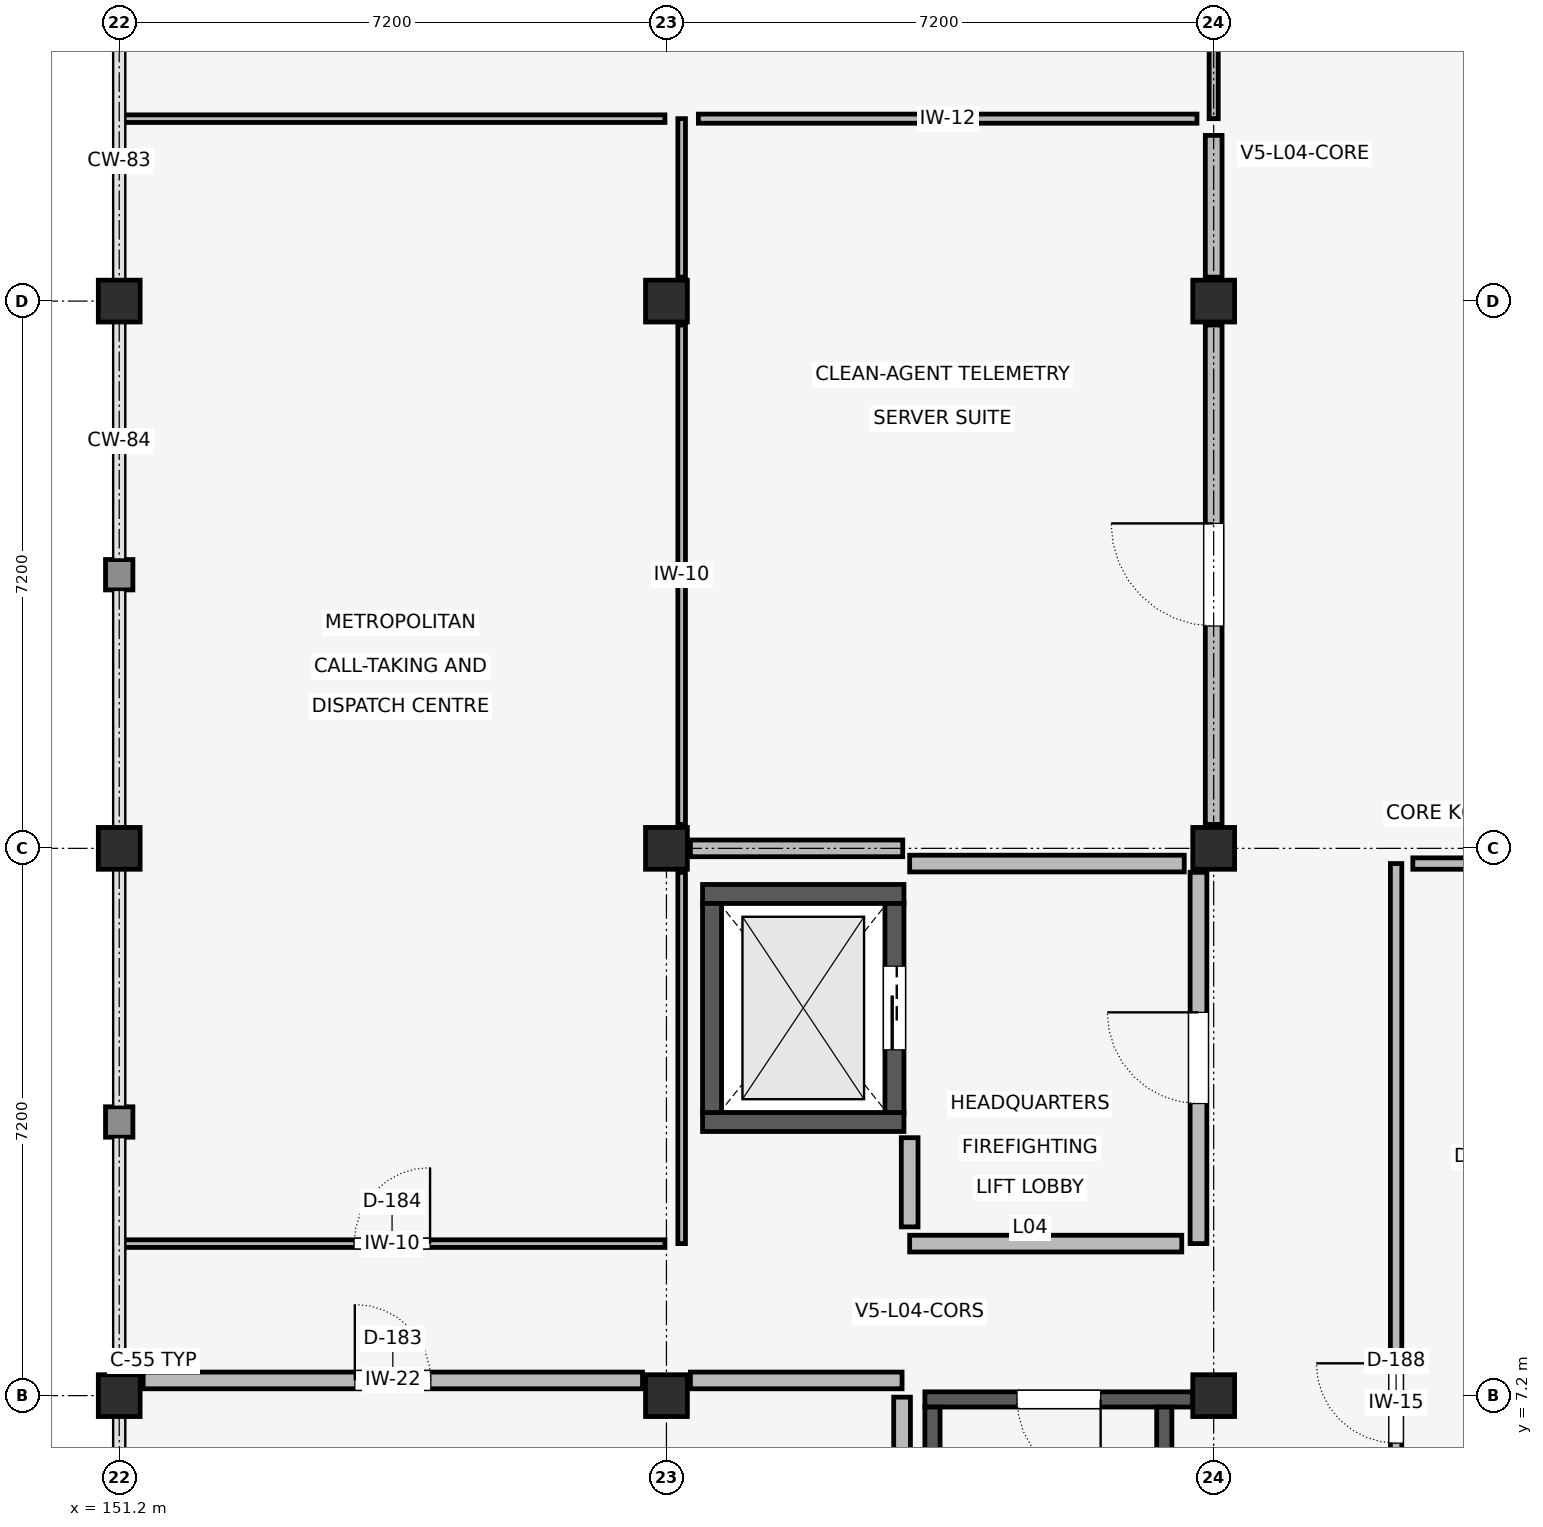
"""IFC4 building model, lengths in metres.
Left out: names, types, materials, properties, quantities, classifications, styles, units other than length and angle.
Written with IfcOpenShell. Run it as: python <this file> out.ifc"""

import sys

from ifc_helpers import new_model, si_unit, direction, frame, frame_2d, origin, origin_2d, place, context, subcontext, project, spatial, rectangle, extrude, element, fill, save


model = new_model("IFC4")
c1 = context("Model", 3, precision=1e-05, world=origin(), true_north=direction((0.0, 1.0)))
c2 = subcontext(c1, "Body", "Model", "MODEL_VIEW")
j1 = project(units=[si_unit("LENGTHUNIT", "METRE"), si_unit("PLANEANGLEUNIT", "RADIAN")], contexts=[c1])
p1 = place(None, origin())
s1 = spatial("IfcSite", under=j1, at=p1, CompositionType="ELEMENT")
p2 = place(p1, origin())
s2 = spatial("IfcBuilding", under=s1, at=p2, CompositionType="ELEMENT")
p3 = place(p2, frame((0.0, 0.0, 17.4)))
s3 = spatial("IfcBuildingStorey", under=s2, at=p3, CompositionType="ELEMENT", Elevation=17.4)
for number, where, z_axis, x_axis in (
    (1, (151.2, 7.2, 0.0), (0.0, 0.0, 1.0), (1.0, 0.0, 0.0)),
    (2, (151.2, 14.4, 0.0), (0.0, 0.0, 1.0), (1.0, 0.0, 0.0)),
    (3, (151.2, 21.6, 0.0), (0.0, 0.0, 1.0), (1.0, 0.0, 0.0)),
    (4, (158.4, 7.2, 0.0), (0.0, 0.0, 1.0), (1.0, 0.0, 0.0)),
    (5, (158.4, 14.4, 0.0), (0.0, 0.0, 1.0), (1.0, 0.0, 0.0)),
    (6, (158.4, 21.6, 0.0), (0.0, 0.0, 1.0), (1.0, 0.0, 0.0)),
    (7, (165.6, 7.2, 0.0), (0.0, 0.0, 1.0), (1.0, 0.0, 0.0)),
    (8, (165.6, 14.4, 0.0), (0.0, 0.0, 1.0), (1.0, 0.0, 0.0)),
    (9, (165.6, 21.6, 0.0), (0.0, 0.0, 1.0), (1.0, 0.0, 0.0)),
):
    element("IfcColumn", number, at=place(p3, frame(where, z_axis=z_axis, x_axis=x_axis)), inside=s3, PredefinedType="COLUMN", context=c2, shape_type="SweptSolid", body=[
        extrude(rectangle(XDim=0.55, YDim=0.55, at=origin_2d()), origin(), (0.0, 0.0, 1.0), 3.9),
    ])
for number, where, z_axis, x_axis in (
    (10, (158.875, 10.8, 0.0), (0.0, 0.0, 1.0), (1.0, 0.0, 0.0)),
    (11, (158.875, 13.8, 0.0), (0.0, 0.0, 1.0), (1.0, 0.0, 0.0)),
):
    element("IfcWall", number, at=place(p3, frame(where, z_axis=z_axis, x_axis=x_axis)), inside=s3, PredefinedType="SHEAR", context=c2, shape_type="SweptSolid", body=[
        extrude(rectangle(XDim=2.65, YDim=0.25, at=frame_2d((1.325, 0.0))), origin(), (0.0, 0.0, 1.0), 3.62),
    ])
p4 = place(p3, frame((159.0, 10.925, 0.0), z_axis=(0.0, 0.0, 1.0), x_axis=(0.0, 1.0, 0.0)))
e12 = element("IfcWall", 12, at=p4, inside=s3, PredefinedType="SHEAR", context=c2, shape_type="SweptSolid", body=[
    extrude(rectangle(XDim=2.75, YDim=0.25, at=frame_2d((1.375, 0.0))), origin(), (0.0, 0.0, 1.0), 3.62),
])
p5 = place(p3, frame((161.4, 10.925, 0.0), z_axis=(0.0, 0.0, 1.0), x_axis=(0.0, 1.0, 0.0)))
e13 = element("IfcWall", 13, at=p5, inside=s3, PredefinedType="SHEAR", context=c2, shape_type="SweptSolid", body=[
    extrude(rectangle(XDim=2.75, YDim=0.25, at=frame_2d((1.375, 0.0))), origin(), (0.0, 0.0, 1.0), 3.62),
])
p6 = place(p5, frame((0.825, 0.0, 0.0)))
e14 = element("IfcOpeningElement", 14, at=p6, cuts=e13, PredefinedType="OPENING", context=c2, shape_type="SweptSolid", body=[
    extrude(rectangle(XDim=1.1, YDim=2.15, at=frame_2d((0.55, 1.075))), frame((0.0, 0.137, 0.0), z_axis=(0.0, -1.0, 0.0), x_axis=(1.0, 0.0, 0.0)), (0.0, 0.0, 1.0), 0.274),
])
p7 = place(p3, frame((161.8, 7.15, 0.0), z_axis=(0.0, 0.0, 1.0), x_axis=(1.0, 0.0, 0.0)))
e15 = element("IfcWall", 15, at=p7, inside=s3, PredefinedType="SHEAR", context=c2, shape_type="SweptSolid", body=[
    extrude(rectangle(XDim=3.525, YDim=0.2, at=frame_2d((1.762, 0.0))), origin(), (0.0, 0.0, 1.0), 3.62),
])
p8 = place(p7, frame((1.212, 0.0, 0.0)))
e16 = element("IfcOpeningElement", 16, at=p8, cuts=e15, PredefinedType="OPENING", context=c2, shape_type="SweptSolid", body=[
    extrude(rectangle(XDim=1.1, YDim=2.15, at=frame_2d((0.55, 1.075))), frame((0.0, 0.112, 0.0), z_axis=(0.0, -1.0, 0.0), x_axis=(1.0, 0.0, 0.0)), (0.0, 0.0, 1.0), 0.224),
])
for number, where, z_axis, x_axis in (
    (17, (161.9, 0.43, 0.0), (0.0, 0.0, 1.0), (0.0, 1.0, 0.0)),
    (18, (164.95, 0.43, 0.0), (0.0, 0.0, 1.0), (0.0, 1.0, 0.0)),
):
    element("IfcWall", number, at=place(p3, frame(where, z_axis=z_axis, x_axis=x_axis)), inside=s3, PredefinedType="SHEAR", context=c2, shape_type="SweptSolid", body=[
        extrude(rectangle(XDim=6.62, YDim=0.2, at=frame_2d((3.31, 0.0))), origin(), (0.0, 0.0, 1.0), 3.62),
    ])
p9 = place(p3, frame((151.2, 18.2, 0.0), z_axis=(0.0, 0.0, 1.0), x_axis=(0.0, -1.0, 0.0)))
e19 = element("IfcWall", 19, at=p9, inside=s3, PredefinedType="SOLIDWALL", context=c2, shape_type="SweptSolid", body=[
    extrude(rectangle(XDim=0.4, YDim=0.36, at=frame_2d((0.2, 0.0))), origin(), (0.0, 0.0, 1.0), 3.01),
])
p10 = place(p3, frame((151.2, 11.0, 0.0), z_axis=(0.0, 0.0, 1.0), x_axis=(0.0, -1.0, 0.0)))
e20 = element("IfcWall", 20, at=p10, inside=s3, PredefinedType="SOLIDWALL", context=c2, shape_type="SweptSolid", body=[
    extrude(rectangle(XDim=0.4, YDim=0.36, at=frame_2d((0.2, 0.0))), origin(), (0.0, 0.0, 1.0), 2.96),
])
p11 = place(p3, frame((165.4, 9.2, 0.0), z_axis=(0.0, 0.0, 1.0), x_axis=(0.0, 1.0, 0.0)))
e21 = element("IfcWall", 21, at=p11, inside=s3, PredefinedType="STANDARD", context=c2, shape_type="SweptSolid", body=[
    extrude(rectangle(XDim=4.885, YDim=0.22, at=frame_2d((2.442, 0.0))), origin(), (0.0, 0.0, 1.0), 2.958),
])
p12 = place(p11, frame((1.843, 0.0, 0.0)))
e22 = element("IfcOpeningElement", 22, at=p12, cuts=e21, PredefinedType="OPENING", context=c2, shape_type="SweptSolid", body=[
    extrude(rectangle(XDim=1.2, YDim=2.2, at=frame_2d((0.6, 1.1))), frame((0.0, 0.122, 0.0), z_axis=(0.0, -1.0, 0.0), x_axis=(1.0, 0.0, 0.0)), (0.0, 0.0, 1.0), 0.244),
])
p13 = place(p3, frame((161.6, 9.2, 0.0), z_axis=(0.0, 0.0, 1.0), x_axis=(1.0, 0.0, 0.0)))
e23 = element("IfcWall", 23, at=p13, inside=s3, PredefinedType="STANDARD", context=c2, shape_type="SweptSolid", body=[
    extrude(rectangle(XDim=3.58, YDim=0.22, at=frame_2d((1.79, 0.0))), origin(), (0.0, 0.0, 1.0), 3.612),
])
p14 = place(p3, frame((161.6, 14.2, 0.0), z_axis=(0.0, 0.0, 1.0), x_axis=(1.0, 0.0, 0.0)))
e24 = element("IfcWall", 24, at=p14, inside=s3, PredefinedType="STANDARD", context=c2, shape_type="SweptSolid", body=[
    extrude(rectangle(XDim=3.613, YDim=0.22, at=frame_2d((1.806, 0.0))), origin(), (0.0, 0.0, 1.0), 2.908),
])
p15 = place(p3, frame((161.6, 9.42, 0.0), z_axis=(0.0, 0.0, 1.0), x_axis=(0.0, 1.0, 0.0)))
e25 = element("IfcWall", 25, at=p15, inside=s3, PredefinedType="STANDARD", context=c2, shape_type="SweptSolid", body=[
    extrude(rectangle(XDim=1.174, YDim=0.22, at=frame_2d((0.587, 0.0))), origin(), (0.0, 0.0, 1.0), 3.612),
])
p16 = place(p3, frame((151.515, 7.4, 0.0), z_axis=(0.0, 0.0, 1.0), x_axis=(1.0, 0.0, 0.0)))
e26 = element("IfcWall", 26, at=p16, inside=s3, PredefinedType="STANDARD", context=c2, shape_type="SweptSolid", body=[
    extrude(rectangle(XDim=6.57, YDim=0.22, at=frame_2d((3.285, 0.0))), origin(), (0.0, 0.0, 1.0), 2.858),
])
p17 = place(p16, frame((2.785, 0.0, 0.0)))
e27 = element("IfcOpeningElement", 27, at=p17, cuts=e26, PredefinedType="OPENING", context=c2, shape_type="SweptSolid", body=[
    extrude(rectangle(XDim=1.0, YDim=2.15, at=frame_2d((0.5, 1.075))), frame((0.0, 0.122, 0.0), z_axis=(0.0, -1.0, 0.0), x_axis=(1.0, 0.0, 0.0)), (0.0, 0.0, 1.0), 0.244),
])
p18 = place(p3, frame((158.715, 7.4, 0.0), z_axis=(0.0, 0.0, 1.0), x_axis=(1.0, 0.0, 0.0)))
e28 = element("IfcWall", 28, at=p18, inside=s3, PredefinedType="STANDARD", context=c2, shape_type="SweptSolid", body=[
    extrude(rectangle(XDim=2.785, YDim=0.22, at=frame_2d((1.393, 0.0))), origin(), (0.0, 0.0, 1.0), 3.612),
])
p19 = place(p3, frame((161.5, 0.0, 0.0), z_axis=(0.0, 0.0, 1.0), x_axis=(0.0, 1.0, 0.0)))
e29 = element("IfcWall", 29, at=p19, inside=s3, PredefinedType="STANDARD", context=c2, shape_type="SweptSolid", body=[
    extrude(rectangle(XDim=7.18, YDim=0.22, at=frame_2d((3.59, 0.0))), origin(), (0.0, 0.0, 1.0), 2.958),
])
p20 = place(p3, frame((158.6, 9.2, 0.0), z_axis=(0.0, 0.0, 1.0), x_axis=(0.0, 1.0, 0.0)))
e30 = element("IfcWall", 30, at=p20, inside=s3, PredefinedType="PARTITIONING", context=c2, shape_type="SweptSolid", body=[
    extrude(rectangle(XDim=4.885, YDim=0.1, at=frame_2d((2.442, 0.0))), origin(), (0.0, 0.0, 1.0), 3.008),
])
p21 = place(p3, frame((158.6, 14.715, 0.0), z_axis=(0.0, 0.0, 1.0), x_axis=(0.0, 1.0, 0.0)))
e31 = element("IfcWall", 31, at=p21, inside=s3, PredefinedType="PARTITIONING", context=c2, shape_type="SweptSolid", body=[
    extrude(rectangle(XDim=6.57, YDim=0.1, at=frame_2d((3.285, 0.0))), origin(), (0.0, 0.0, 1.0), 2.958),
])
p22 = place(p3, frame((158.6, 21.915, 0.0), z_axis=(0.0, 0.0, 1.0), x_axis=(0.0, 1.0, 0.0)))
e32 = element("IfcWall", 32, at=p22, inside=s3, PredefinedType="PARTITIONING", context=c2, shape_type="SweptSolid", body=[
    extrude(rectangle(XDim=2.085, YDim=0.1, at=frame_2d((1.042, 0.0))), origin(), (0.0, 0.0, 1.0), 3.008),
])
p23 = place(p3, frame((151.2, 9.2, 0.0), z_axis=(0.0, 0.0, 1.0), x_axis=(1.0, 0.0, 0.0)))
e33 = element("IfcWall", 33, at=p23, inside=s3, PredefinedType="PARTITIONING", context=c2, shape_type="SweptSolid", body=[
    extrude(rectangle(XDim=7.18, YDim=0.1, at=frame_2d((3.59, 0.0))), origin(), (0.0, 0.0, 1.0), 2.958),
])
p24 = place(p23, frame((3.09, 0.0, 0.0)))
e34 = element("IfcOpeningElement", 34, at=p24, cuts=e33, PredefinedType="OPENING", context=c2, shape_type="SweptSolid", body=[
    extrude(rectangle(XDim=1.0, YDim=2.15, at=frame_2d((0.5, 1.075))), frame((0.0, 0.062, 0.0), z_axis=(0.0, -1.0, 0.0), x_axis=(1.0, 0.0, 0.0)), (0.0, 0.0, 1.0), 0.124),
])
p25 = place(p3, frame((151.2, 24.0, 0.0), z_axis=(0.0, 0.0, 1.0), x_axis=(1.0, 0.0, 0.0)))
e35 = element("IfcWall", 35, at=p25, inside=s3, PredefinedType="PARTITIONING", context=c2, shape_type="SweptSolid", body=[
    extrude(rectangle(XDim=7.18, YDim=0.1, at=frame_2d((3.59, 0.0))), origin(), (0.0, 0.0, 1.0), 2.958),
])
p26 = place(p3, frame((165.6, 24.0, 0.0), z_axis=(0.0, 0.0, 1.0), x_axis=(0.0, 1.0, 0.0)))
e36 = element("IfcWall", 36, at=p26, inside=s3, PredefinedType="PARTITIONING", context=c2, shape_type="SweptSolid", body=[
    extrude(rectangle(XDim=4.485, YDim=0.12, at=frame_2d((2.243, 0.0))), origin(), (0.0, 0.0, 1.0), 2.958),
])
p27 = place(p26, frame((1.718, 0.0, 0.0)))
e37 = element("IfcOpeningElement", 37, at=p27, cuts=e36, PredefinedType="OPENING", context=c2, shape_type="SweptSolid", body=[
    extrude(rectangle(XDim=1.05, YDim=2.15, at=frame_2d((0.525, 1.075))), frame((0.0, 0.072, 0.0), z_axis=(0.0, -1.0, 0.0), x_axis=(1.0, 0.0, 0.0)), (0.0, 0.0, 1.0), 0.144),
])
p28 = place(p3, frame((158.82, 24.0, 0.0), z_axis=(0.0, 0.0, 1.0), x_axis=(1.0, 0.0, 0.0)))
e38 = element("IfcWall", 38, at=p28, inside=s3, PredefinedType="PARTITIONING", context=c2, shape_type="SweptSolid", body=[
    extrude(rectangle(XDim=6.56, YDim=0.12, at=frame_2d((3.28, 0.0))), origin(), (0.0, 0.0, 1.0), 3.058),
])
p29 = place(p3, frame((165.6, 14.715, 0.0), z_axis=(0.0, 0.0, 1.0), x_axis=(0.0, 1.0, 0.0)))
e39 = element("IfcWall", 39, at=p29, inside=s3, PredefinedType="STANDARD", context=c2, shape_type="SweptSolid", body=[
    extrude(rectangle(XDim=6.57, YDim=0.22, at=frame_2d((3.285, 0.0))), origin(), (0.0, 0.0, 1.0), 3.008),
])
p30 = place(p29, frame((2.61, 0.0, 0.0)))
e40 = element("IfcOpeningElement", 40, at=p30, cuts=e39, PredefinedType="OPENING", context=c2, shape_type="SweptSolid", body=[
    extrude(rectangle(XDim=1.35, YDim=2.2, at=frame_2d((0.675, 1.1))), frame((0.0, 0.122, 0.0), z_axis=(0.0, -1.0, 0.0), x_axis=(1.0, 0.0, 0.0)), (0.0, 0.0, 1.0), 0.244),
])
p31 = place(p3, frame((165.6, 21.915, 0.0), z_axis=(0.0, 0.0, 1.0), x_axis=(0.0, 1.0, 0.0)))
e41 = element("IfcWall", 41, at=p31, inside=s3, PredefinedType="STANDARD", context=c2, shape_type="SweptSolid", body=[
    extrude(rectangle(XDim=1.865, YDim=0.22, at=frame_2d((0.933, 0.0))), origin(), (0.0, 0.0, 1.0), 2.958),
])
p32 = place(p3, frame((158.715, 14.4, 0.0), z_axis=(0.0, 0.0, 1.0), x_axis=(1.0, 0.0, 0.0)))
e42 = element("IfcWall", 42, at=p32, inside=s3, PredefinedType="STANDARD", context=c2, shape_type="SweptSolid", body=[
    extrude(rectangle(XDim=2.794, YDim=0.22, at=frame_2d((1.397, 0.0))), origin(), (0.0, 0.0, 1.0), 2.908),
])
p33 = place(p3, frame((168.0, 0.0, 0.0), z_axis=(0.0, 0.0, 1.0), x_axis=(0.0, 1.0, 0.0)))
e43 = element("IfcWall", 43, at=p33, inside=s3, PredefinedType="STANDARD", context=c2, shape_type="SweptSolid", body=[
    extrude(rectangle(XDim=14.2, YDim=0.15, at=frame_2d((7.1, 0.0))), origin(), (0.0, 0.0, 1.0), 2.908),
])
p34 = place(p33, frame((6.575, 0.0, 0.0)))
e44 = element("IfcOpeningElement", 44, at=p34, cuts=e43, PredefinedType="OPENING", context=c2, shape_type="SweptSolid", body=[
    extrude(rectangle(XDim=1.05, YDim=2.15, at=frame_2d((0.525, 1.075))), frame((0.0, 0.087, 0.0), z_axis=(0.0, -1.0, 0.0), x_axis=(1.0, 0.0, 0.0)), (0.0, 0.0, 1.0), 0.174),
])
p35 = place(p3, frame((168.22, 14.2, 0.0), z_axis=(0.0, 0.0, 1.0), x_axis=(1.0, 0.0, 0.0)))
e45 = element("IfcWall", 45, at=p35, inside=s3, PredefinedType="STANDARD", context=c2, shape_type="SweptSolid", body=[
    extrude(rectangle(XDim=4.265, YDim=0.15, at=frame_2d((2.133, 0.0))), origin(), (0.0, 0.0, 1.0), 3.612),
])
p36 = place(p8, frame((1.1, 0.0, 0.0), z_axis=(0.0, 0.0, 1.0), x_axis=(-1.0, 0.0, 0.0)))
e46 = element("IfcDoor", 46, at=p36, inside=s3, OperationType="SINGLE_SWING_LEFT", PredefinedType="DOOR", context=c2, shape_type="SweptSolid", body=[
    extrude(rectangle(XDim=1.1, YDim=2.15, at=frame_2d((0.55, 1.075))), frame((0.0, 0.025, 0.0), z_axis=(0.0, -1.0, 0.0), x_axis=(1.0, 0.0, 0.0)), (0.0, 0.0, 1.0), 0.05),
])
fill(e16, e46)
p37 = place(p6, origin())
e47 = element("IfcDoor", 47, at=p37, inside=s3, OperationType="SLIDING_TO_LEFT", PredefinedType="DOOR", context=c2, shape_type="SweptSolid", body=[
    extrude(rectangle(XDim=1.1, YDim=2.15, at=frame_2d((0.55, 1.075))), frame((0.0, 0.025, 0.0), z_axis=(0.0, -1.0, 0.0), x_axis=(1.0, 0.0, 0.0)), (0.0, 0.0, 1.0), 0.05),
])
fill(e14, e47)
p38 = place(p12, origin())
e48 = element("IfcDoor", 48, at=p38, inside=s3, OperationType="SINGLE_SWING_RIGHT", PredefinedType="DOOR", context=c2, shape_type="SweptSolid", body=[
    extrude(rectangle(XDim=1.2, YDim=2.2, at=frame_2d((0.6, 1.1))), frame((0.0, 0.025, 0.0), z_axis=(0.0, -1.0, 0.0), x_axis=(1.0, 0.0, 0.0)), (0.0, 0.0, 1.0), 0.05),
])
fill(e22, e48)
p39 = place(p17, origin())
e49 = element("IfcDoor", 49, at=p39, inside=s3, OperationType="SINGLE_SWING_LEFT", PredefinedType="DOOR", context=c2, shape_type="SweptSolid", body=[
    extrude(rectangle(XDim=1.0, YDim=2.15, at=frame_2d((0.5, 1.075))), frame((0.0, 0.025, 0.0), z_axis=(0.0, -1.0, 0.0), x_axis=(1.0, 0.0, 0.0)), (0.0, 0.0, 1.0), 0.05),
])
fill(e27, e49)
p40 = place(p24, origin())
e50 = element("IfcDoor", 50, at=p40, inside=s3, OperationType="SINGLE_SWING_RIGHT", PredefinedType="DOOR", context=c2, shape_type="SweptSolid", body=[
    extrude(rectangle(XDim=1.0, YDim=2.15, at=frame_2d((0.5, 1.075))), frame((0.0, 0.025, 0.0), z_axis=(0.0, -1.0, 0.0), x_axis=(1.0, 0.0, 0.0)), (0.0, 0.0, 1.0), 0.05),
])
fill(e34, e50)
p41 = place(p30, origin())
e51 = element("IfcDoor", 51, at=p41, inside=s3, OperationType="SINGLE_SWING_RIGHT", PredefinedType="DOOR", context=c2, shape_type="SweptSolid", body=[
    extrude(rectangle(XDim=1.35, YDim=2.2, at=frame_2d((0.675, 1.1))), frame((0.0, 0.025, 0.0), z_axis=(0.0, -1.0, 0.0), x_axis=(1.0, 0.0, 0.0)), (0.0, 0.0, 1.0), 0.05),
])
fill(e40, e51)
p42 = place(p34, origin())
e52 = element("IfcDoor", 52, at=p42, inside=s3, OperationType="SINGLE_SWING_RIGHT", PredefinedType="DOOR", context=c2, shape_type="SweptSolid", body=[
    extrude(rectangle(XDim=1.05, YDim=2.15, at=frame_2d((0.525, 1.075))), frame((0.0, 0.025, 0.0), z_axis=(0.0, -1.0, 0.0), x_axis=(1.0, 0.0, 0.0)), (0.0, 0.0, 1.0), 0.05),
])
fill(e44, e52)
save(model, sys.argv[1])
